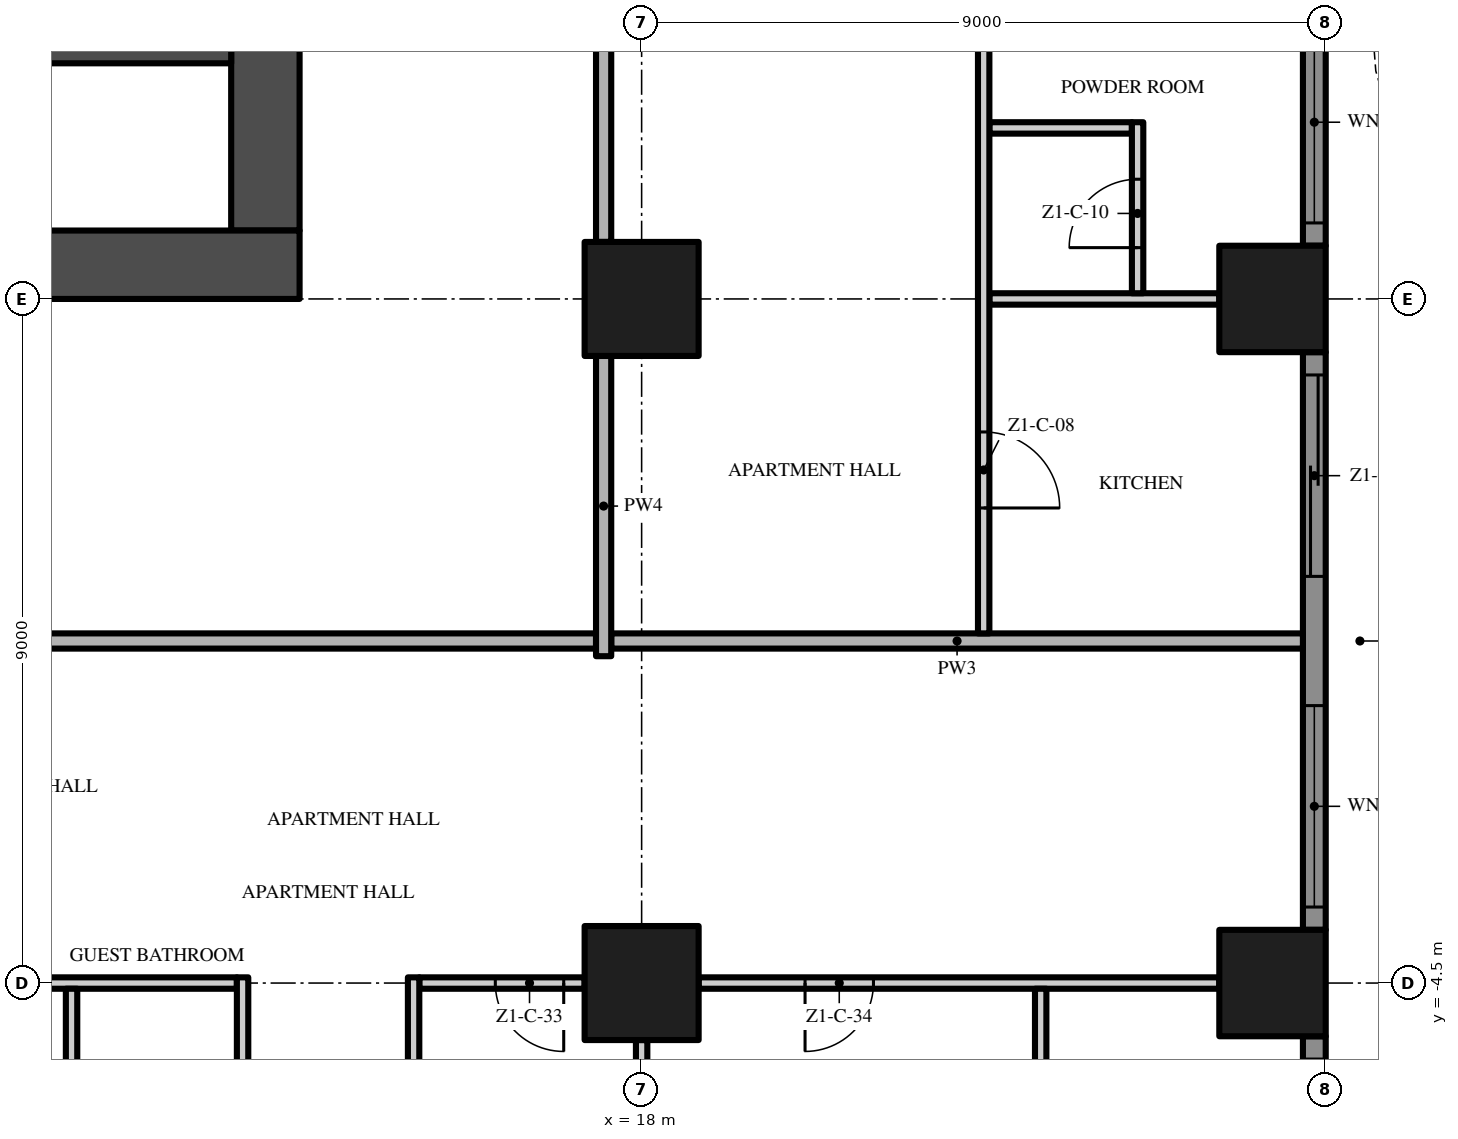
"""IFC4 building model, lengths in metres.
Left out: names, types, materials, properties, quantities, classifications, styles, units other than length and angle.
Written with IfcOpenShell. Run it as: python <this file> out.ifc"""

import sys

from ifc_helpers import new_model, si_unit, direction, frame, frame_2d, origin, origin_2d, place, context, subcontext, project, spatial, polyline, rectangle, outline, extrude, element, fill, save


model = new_model("IFC4")
c1 = context("Model", 3, precision=1e-05, world=origin(), true_north=direction((0.0, 1.0)))
c2 = subcontext(c1, "Body", "Model", "MODEL_VIEW")
j1 = project(units=[si_unit("LENGTHUNIT", "METRE"), si_unit("PLANEANGLEUNIT", "RADIAN")], contexts=[c1])
p1 = place(None, origin())
s1 = spatial("IfcSite", under=j1, at=p1, CompositionType="ELEMENT")
p2 = place(p1, origin())
s2 = spatial("IfcBuilding", under=s1, at=p2, CompositionType="ELEMENT")
p3 = place(p2, frame((0.0, 0.0, 45.4)))
s3 = spatial("IfcBuildingStorey", under=s2, at=p3, CompositionType="ELEMENT", Elevation=45.4)
p4 = place(p3, frame((-13.5, 4.95, -0.3), z_axis=(0.0, 0.0, 1.0), x_axis=(1.0, 0.0, 0.0)))
e1 = element("IfcWall", 1, at=p4, inside=s3, PredefinedType="SHEAR", context=c2, shape_type="SweptSolid", body=[
    extrude(rectangle(XDim=27.0, YDim=0.9, at=frame_2d((13.5, 0.0))), origin(), (0.0, 0.0, 1.0), 3.8),
])
p5 = place(p4, frame((12.0, 0.0, 0.3)))
e2 = element("IfcOpeningElement", 2, at=p5, cuts=e1, PredefinedType="OPENING", context=c2, shape_type="SweptSolid", body=[
    extrude(rectangle(XDim=3.0, YDim=2.4, at=frame_2d((1.5, 1.2))), frame((0.0, 0.46, 0.0), z_axis=(0.0, -1.0, 0.0), x_axis=(1.0, 0.0, 0.0)), (0.0, 0.0, 1.0), 0.92),
])
p6 = place(p4, frame((4.9, 0.0, 0.3)))
e3 = element("IfcOpeningElement", 3, at=p6, cuts=e1, PredefinedType="OPENING", context=c2, shape_type="SweptSolid", body=[
    extrude(rectangle(XDim=1.2, YDim=2.2, at=frame_2d((0.6, 1.1))), frame((0.0, 0.46, 0.0), z_axis=(0.0, -1.0, 0.0), x_axis=(1.0, 0.0, 0.0)), (0.0, 0.0, 1.0), 0.92),
])
p7 = place(p4, frame((20.75, 0.0, 0.3)))
e4 = element("IfcOpeningElement", 4, at=p7, cuts=e1, PredefinedType="OPENING", context=c2, shape_type="SweptSolid", body=[
    extrude(rectangle(XDim=1.5, YDim=2.2, at=frame_2d((0.75, 1.1))), frame((0.0, 0.46, 0.0), z_axis=(0.0, -1.0, 0.0), x_axis=(1.0, 0.0, 0.0)), (0.0, 0.0, 1.0), 0.92),
])
p8 = place(p4, frame((17.4, 0.0, 0.3)))
e5 = element("IfcOpeningElement", 5, at=p8, cuts=e1, PredefinedType="OPENING", context=c2, shape_type="SweptSolid", body=[
    extrude(rectangle(XDim=1.2, YDim=2.2, at=frame_2d((0.6, 1.1))), frame((0.0, 0.46, 0.0), z_axis=(0.0, -1.0, 0.0), x_axis=(1.0, 0.0, 0.0)), (0.0, 0.0, 1.0), 0.92),
])
p9 = place(p3, frame((13.05, 5.4, -0.3), z_axis=(0.0, 0.0, 1.0), x_axis=(0.0, 1.0, 0.0)))
e6 = element("IfcWall", 6, at=p9, inside=s3, PredefinedType="SHEAR", context=c2, shape_type="SweptSolid", body=[
    extrude(rectangle(XDim=16.2, YDim=0.9, at=frame_2d((8.1, 0.0))), origin(), (0.0, 0.0, 1.0), 3.8),
])
p10 = place(p9, frame((6.0, 0.0, 0.3)))
e7 = element("IfcOpeningElement", 7, at=p10, cuts=e6, PredefinedType="OPENING", context=c2, shape_type="SweptSolid", body=[
    extrude(rectangle(XDim=1.2, YDim=2.2, at=frame_2d((0.6, 1.1))), frame((0.0, 0.46, 0.0), z_axis=(0.0, -1.0, 0.0), x_axis=(1.0, 0.0, 0.0)), (0.0, 0.0, 1.0), 0.92),
])
for number, where, z_axis, x_axis in (
    (8, (18.0, -4.5, 0.0), (0.0, 0.0, 1.0), (1.0, 0.0, 0.0)),
    (9, (18.0, 4.5, 0.0), (0.0, 0.0, 1.0), (1.0, 0.0, 0.0)),
):
    element("IfcColumn", number, at=place(p3, frame(where, z_axis=z_axis, x_axis=x_axis)), inside=s3, PredefinedType="COLUMN", context=c2, shape_type="SweptSolid", body=[
        extrude(rectangle(XDim=1.5, YDim=1.5, at=origin_2d()), origin(), (0.0, 0.0, 1.0), 3.5),
    ])
for number, where, z_axis, x_axis in (
    (10, (26.3, -4.5, 0.0), (0.0, 0.0, 1.0), (1.0, 0.0, 0.0)),
    (11, (26.3, 4.5, 0.0), (0.0, 0.0, 1.0), (1.0, 0.0, 0.0)),
):
    element("IfcColumn", number, at=place(p3, frame(where, z_axis=z_axis, x_axis=x_axis)), inside=s3, PredefinedType="COLUMN", context=c2, shape_type="SweptSolid", body=[
        extrude(rectangle(XDim=1.4, YDim=1.4, at=origin_2d()), origin(), (0.0, 0.0, 1.0), 3.5),
    ])
p11 = place(p3, frame((26.85, -5.2, 0.0), z_axis=(0.0, 0.0, 1.0), x_axis=(0.0, -1.0, 0.0)))
e12 = element("IfcWall", 12, at=p11, inside=s3, PredefinedType="SOLIDWALL", context=c2, shape_type="SweptSolid", body=[
    extrude(rectangle(XDim=7.6, YDim=0.3, at=frame_2d((3.8, 0.0))), origin(), (0.0, 0.0, 1.0), 3.5),
])
p12 = place(p11, frame((4.65, 0.0, 0.45)))
e13 = element("IfcOpeningElement", 13, at=p12, cuts=e12, PredefinedType="OPENING", context=c2, shape_type="SweptSolid", body=[
    extrude(rectangle(XDim=2.65, YDim=2.65, at=frame_2d((1.325, 1.325))), frame((0.0, 0.16, 0.0), z_axis=(0.0, -1.0, 0.0), x_axis=(1.0, 0.0, 0.0)), (0.0, 0.0, 1.0), 0.32),
])
p13 = place(p11, frame((0.3, 0.0, 0.45)))
e14 = element("IfcOpeningElement", 14, at=p13, cuts=e12, PredefinedType="OPENING", context=c2, shape_type="SweptSolid", body=[
    extrude(rectangle(XDim=2.65, YDim=2.65, at=frame_2d((1.325, 1.325))), frame((0.0, 0.16, 0.0), z_axis=(0.0, -1.0, 0.0), x_axis=(1.0, 0.0, 0.0)), (0.0, 0.0, 1.0), 0.32),
])
p14 = place(p3, frame((26.85, 3.8, 0.0), z_axis=(0.0, 0.0, 1.0), x_axis=(0.0, -1.0, 0.0)))
e15 = element("IfcWall", 15, at=p14, inside=s3, PredefinedType="SOLIDWALL", context=c2, shape_type="SweptSolid", body=[
    extrude(rectangle(XDim=7.6, YDim=0.3, at=frame_2d((3.8, 0.0))), origin(), (0.0, 0.0, 1.0), 3.5),
])
p15 = place(p14, frame((4.65, 0.0, 0.45)))
e16 = element("IfcOpeningElement", 16, at=p15, cuts=e15, PredefinedType="OPENING", context=c2, shape_type="SweptSolid", body=[
    extrude(rectangle(XDim=2.65, YDim=2.65, at=frame_2d((1.325, 1.325))), frame((0.0, 0.16, 0.0), z_axis=(0.0, -1.0, 0.0), x_axis=(1.0, 0.0, 0.0)), (0.0, 0.0, 1.0), 0.32),
])
p16 = place(p14, frame((0.3, 0.0, 0.0)))
e17 = element("IfcOpeningElement", 17, at=p16, cuts=e15, PredefinedType="OPENING", context=c2, shape_type="SweptSolid", body=[
    extrude(rectangle(XDim=2.65, YDim=2.4, at=frame_2d((1.325, 1.2))), frame((0.0, 0.16, 0.0), z_axis=(0.0, -1.0, 0.0), x_axis=(1.0, 0.0, 0.0)), (0.0, 0.0, 1.0), 0.32),
])
p17 = place(p3, frame((26.85, 12.8, 0.0), z_axis=(0.0, 0.0, 1.0), x_axis=(0.0, -1.0, 0.0)))
e18 = element("IfcWall", 18, at=p17, inside=s3, PredefinedType="SOLIDWALL", context=c2, shape_type="SweptSolid", body=[
    extrude(rectangle(XDim=7.6, YDim=0.3, at=frame_2d((3.8, 0.0))), origin(), (0.0, 0.0, 1.0), 3.5),
])
p18 = place(p17, frame((4.65, 0.0, 0.45)))
e19 = element("IfcOpeningElement", 19, at=p18, cuts=e18, PredefinedType="OPENING", context=c2, shape_type="SweptSolid", body=[
    extrude(rectangle(XDim=2.65, YDim=2.65, at=frame_2d((1.325, 1.325))), frame((0.0, 0.16, 0.0), z_axis=(0.0, -1.0, 0.0), x_axis=(1.0, 0.0, 0.0)), (0.0, 0.0, 1.0), 0.32),
])
p19 = place(p17, frame((0.3, 0.0, 0.45)))
e20 = element("IfcOpeningElement", 20, at=p19, cuts=e18, PredefinedType="OPENING", context=c2, shape_type="SweptSolid", body=[
    extrude(rectangle(XDim=2.65, YDim=2.65, at=frame_2d((1.325, 1.325))), frame((0.0, 0.16, 0.0), z_axis=(0.0, -1.0, 0.0), x_axis=(1.0, 0.0, 0.0)), (0.0, 0.0, 1.0), 0.32),
])
p20 = place(p3, origin())
e21 = element("IfcWall", 21, at=p20, inside=s3, PredefinedType="USERDEFINED", context=c2, shape_type="SweptSolid", body=[
    extrude(outline(polyline([(28.8, -18.0), (29.505, -16.5), (29.941, -15.0), (30.0, -14.25), (29.941, -13.5), (29.505, -12.0), (28.8, -10.5), (28.095, -9.0), (27.659, -7.5), (27.6, -6.75), (27.659, -6.0), (28.095, -4.5), (28.8, -3.0), (29.505, -1.5), (29.941, 0.0), (30.0, 0.75), (29.941, 1.5), (29.505, 3.0), (28.8, 4.5), (28.095, 6.0), (27.659, 7.5), (27.6, 8.25), (27.659, 9.0), (28.095, 10.5), (28.8, 12.0), (29.505, 13.5), (29.941, 15.0), (30.0, 15.75), (29.941, 16.5), (29.505, 18.0), (29.265, 17.93), (29.694, 16.455), (29.749, 15.75), (29.694, 15.045), (29.271, 13.589), (28.574, 12.106), (27.86, 10.589), (27.411, 9.045), (27.349, 8.25), (27.411, 7.455), (27.86, 5.911), (28.574, 4.394), (29.271, 2.911), (29.694, 1.455), (29.749, 0.75), (29.694, 0.045), (29.271, -1.411), (28.574, -2.894), (27.86, -4.411), (27.411, -5.955), (27.349, -6.75), (27.411, -7.545), (27.86, -9.089), (28.574, -10.606), (29.271, -12.089), (29.694, -13.545), (29.749, -14.25), (29.694, -14.955), (29.271, -16.411), (28.574, -17.894), (28.8, -18.0)])), origin(), (0.0, 0.0, 1.0), 0.9),
])
p21 = place(p3, frame((9.65, 7.7, 0.0), z_axis=(0.0, 0.0, 1.0), x_axis=(1.0, 0.0, 0.0)))
e22 = element("IfcWall", 22, at=p21, inside=s3, PredefinedType="SHEAR", context=c2, shape_type="SweptSolid", body=[
    extrude(rectangle(XDim=2.95, YDim=0.2, at=frame_2d((1.475, 0.0))), origin(), (0.0, 0.0, 1.0), 3.5),
])
p22 = place(p3, frame((9.75, -4.5, 0.0), z_axis=(0.0, 0.0, 1.0), x_axis=(1.0, 0.0, 0.0)))
e23 = element("IfcWall", 23, at=p22, inside=s3, PredefinedType="PARTITIONING", context=c2, shape_type="SweptSolid", body=[
    extrude(rectangle(XDim=2.925, YDim=0.15, at=frame_2d((1.462, 0.0))), origin(), (0.0, 0.0, 1.0), 3.5),
])
p23 = place(p3, frame((17.25, -4.5, 0.0), z_axis=(0.0, 0.0, 1.0), x_axis=(-1.0, 0.0, 0.0)))
e24 = element("IfcWall", 24, at=p23, inside=s3, PredefinedType="PARTITIONING", context=c2, shape_type="SweptSolid", body=[
    extrude(rectangle(XDim=2.175, YDim=0.15, at=frame_2d((1.087, 0.0))), origin(), (0.0, 0.0, 1.0), 3.5),
])
p24 = place(p23, frame((0.275, 0.0, 0.0)))
e25 = element("IfcOpeningElement", 25, at=p24, cuts=e24, PredefinedType="OPENING", context=c2, shape_type="SweptSolid", body=[
    extrude(rectangle(XDim=0.9, YDim=2.1, at=frame_2d((0.45, 1.05))), frame((0.0, 0.085, 0.0), z_axis=(0.0, -1.0, 0.0), x_axis=(1.0, 0.0, 0.0)), (0.0, 0.0, 1.0), 0.17),
])
p25 = place(p3, frame((25.6, -4.5, 0.0), z_axis=(0.0, 0.0, 1.0), x_axis=(-1.0, 0.0, 0.0)))
e26 = element("IfcWall", 26, at=p25, inside=s3, PredefinedType="PARTITIONING", context=c2, shape_type="SweptSolid", body=[
    extrude(rectangle(XDim=6.85, YDim=0.15, at=frame_2d((3.425, 0.0))), origin(), (0.0, 0.0, 1.0), 3.5),
])
p26 = place(p25, frame((4.55, 0.0, 0.0)))
e27 = element("IfcOpeningElement", 27, at=p26, cuts=e26, PredefinedType="OPENING", context=c2, shape_type="SweptSolid", body=[
    extrude(rectangle(XDim=0.9, YDim=2.1, at=frame_2d((0.45, 1.05))), frame((0.0, 0.085, 0.0), z_axis=(0.0, -1.0, 0.0), x_axis=(1.0, 0.0, 0.0)), (0.0, 0.0, 1.0), 0.17),
])
p27 = place(p3, frame((17.4, 0.0, 0.0), z_axis=(0.0, 0.0, 1.0), x_axis=(-1.0, 0.0, 0.0)))
e28 = element("IfcWall", 28, at=p27, inside=s3, PredefinedType="PARTITIONING", context=c2, shape_type="SweptSolid", body=[
    extrude(rectangle(XDim=17.3, YDim=0.2, at=frame_2d((8.65, 0.0))), origin(), (0.0, 0.0, 1.0), 3.5),
])
p28 = place(p27, frame((7.65, 0.0, 0.0)))
e29 = element("IfcOpeningElement", 29, at=p28, cuts=e28, PredefinedType="OPENING", context=c2, shape_type="SweptSolid", body=[
    extrude(rectangle(XDim=1.5, YDim=2.4, at=frame_2d((0.75, 1.2))), frame((0.0, 0.11, 0.0), z_axis=(0.0, -1.0, 0.0), x_axis=(1.0, 0.0, 0.0)), (0.0, 0.0, 1.0), 0.22),
])
p29 = place(p3, frame((17.6, 0.0, 0.0), z_axis=(0.0, 0.0, 1.0), x_axis=(1.0, 0.0, 0.0)))
e30 = element("IfcWall", 30, at=p29, inside=s3, PredefinedType="PARTITIONING", context=c2, shape_type="SweptSolid", body=[
    extrude(rectangle(XDim=9.1, YDim=0.2, at=frame_2d((4.55, 0.0))), origin(), (0.0, 0.0, 1.0), 3.5),
])
p30 = place(p3, frame((22.575, 4.5, 0.0), z_axis=(0.0, 0.0, 1.0), x_axis=(1.0, 0.0, 0.0)))
e31 = element("IfcWall", 31, at=p30, inside=s3, PredefinedType="PARTITIONING", context=c2, shape_type="SweptSolid", body=[
    extrude(rectangle(XDim=3.025, YDim=0.15, at=frame_2d((1.512, 0.0))), origin(), (0.0, 0.0, 1.0), 3.5),
])
p31 = place(p3, frame((22.575, 6.75, 0.0), z_axis=(0.0, 0.0, 1.0), x_axis=(1.0, 0.0, 0.0)))
e32 = element("IfcWall", 32, at=p31, inside=s3, PredefinedType="PARTITIONING", context=c2, shape_type="SweptSolid", body=[
    extrude(rectangle(XDim=1.875, YDim=0.15, at=frame_2d((0.938, 0.0))), origin(), (0.0, 0.0, 1.0), 3.5),
])
p32 = place(p3, frame((10.5, -8.925, 0.0), z_axis=(0.0, 0.0, 1.0), x_axis=(0.0, 1.0, 0.0)))
e33 = element("IfcWall", 33, at=p32, inside=s3, PredefinedType="PARTITIONING", context=c2, shape_type="SweptSolid", body=[
    extrude(rectangle(XDim=4.35, YDim=0.15, at=frame_2d((2.175, 0.0))), origin(), (0.0, 0.0, 1.0), 3.5),
])
p33 = place(p3, frame((12.75, -8.925, 0.0), z_axis=(0.0, 0.0, 1.0), x_axis=(0.0, 1.0, 0.0)))
e34 = element("IfcWall", 34, at=p33, inside=s3, PredefinedType="PARTITIONING", context=c2, shape_type="SweptSolid", body=[
    extrude(rectangle(XDim=4.5, YDim=0.15, at=frame_2d((2.25, 0.0))), origin(), (0.0, 0.0, 1.0), 3.5),
])
p34 = place(p33, frame((1.75, 0.0, 0.0)))
e35 = element("IfcOpeningElement", 35, at=p34, cuts=e34, PredefinedType="OPENING", context=c2, shape_type="SweptSolid", body=[
    extrude(rectangle(XDim=0.9, YDim=2.1, at=frame_2d((0.45, 1.05))), frame((0.0, 0.085, 0.0), z_axis=(0.0, -1.0, 0.0), x_axis=(1.0, 0.0, 0.0)), (0.0, 0.0, 1.0), 0.17),
])
p35 = place(p3, frame((15.0, -9.075, 0.0), z_axis=(0.0, 0.0, 1.0), x_axis=(0.0, 1.0, 0.0)))
e36 = element("IfcWall", 36, at=p35, inside=s3, PredefinedType="PARTITIONING", context=c2, shape_type="SweptSolid", body=[
    extrude(rectangle(XDim=4.65, YDim=0.15, at=frame_2d((2.325, 0.0))), origin(), (0.0, 0.0, 1.0), 3.5),
])
p36 = place(p3, frame((17.5, -0.2, 0.0), z_axis=(0.0, 0.0, 1.0), x_axis=(0.0, 1.0, 0.0)))
e37 = element("IfcWall", 37, at=p36, inside=s3, PredefinedType="PARTITIONING", context=c2, shape_type="SweptSolid", body=[
    extrude(rectangle(XDim=3.95, YDim=0.2, at=frame_2d((1.975, 0.0))), origin(), (0.0, 0.0, 1.0), 3.5),
])
p37 = place(p3, frame((17.5, 12.75, 0.0), z_axis=(0.0, 0.0, 1.0), x_axis=(0.0, -1.0, 0.0)))
e38 = element("IfcWall", 38, at=p37, inside=s3, PredefinedType="PARTITIONING", context=c2, shape_type="SweptSolid", body=[
    extrude(rectangle(XDim=7.5, YDim=0.2, at=frame_2d((3.75, 0.0))), origin(), (0.0, 0.0, 1.0), 3.5),
])
p38 = place(p37, frame((3.15, 0.0, 0.0)))
e39 = element("IfcOpeningElement", 39, at=p38, cuts=e38, PredefinedType="OPENING", context=c2, shape_type="SweptSolid", body=[
    extrude(rectangle(XDim=1.2, YDim=2.4, at=frame_2d((0.6, 1.2))), frame((0.0, 0.11, 0.0), z_axis=(0.0, -1.0, 0.0), x_axis=(1.0, 0.0, 0.0)), (0.0, 0.0, 1.0), 0.22),
])
p39 = place(p3, frame((18.0, -8.925, 0.0), z_axis=(0.0, 0.0, 1.0), x_axis=(0.0, 1.0, 0.0)))
e40 = element("IfcWall", 40, at=p39, inside=s3, PredefinedType="PARTITIONING", context=c2, shape_type="SweptSolid", body=[
    extrude(rectangle(XDim=3.675, YDim=0.15, at=frame_2d((1.837, 0.0))), origin(), (0.0, 0.0, 1.0), 3.5),
])
p40 = place(p3, frame((22.5, 17.3, 0.0), z_axis=(0.0, 0.0, 1.0), x_axis=(0.0, -1.0, 0.0)))
e41 = element("IfcWall", 41, at=p40, inside=s3, PredefinedType="PARTITIONING", context=c2, shape_type="SweptSolid", body=[
    extrude(rectangle(XDim=17.2, YDim=0.15, at=frame_2d((8.6, 0.0))), origin(), (0.0, 0.0, 1.0), 3.5),
])
p41 = place(p40, frame((14.55, 0.0, 0.0)))
e42 = element("IfcOpeningElement", 42, at=p41, cuts=e41, PredefinedType="OPENING", context=c2, shape_type="SweptSolid", body=[
    extrude(rectangle(XDim=1.0, YDim=2.4, at=frame_2d((0.5, 1.2))), frame((0.0, 0.085, 0.0), z_axis=(0.0, -1.0, 0.0), x_axis=(1.0, 0.0, 0.0)), (0.0, 0.0, 1.0), 0.17),
])
p42 = place(p40, frame((7.4, 0.0, 0.0)))
e43 = element("IfcOpeningElement", 43, at=p42, cuts=e41, PredefinedType="OPENING", context=c2, shape_type="SweptSolid", body=[
    extrude(rectangle(XDim=1.8, YDim=2.4, at=frame_2d((0.9, 1.2))), frame((0.0, 0.085, 0.0), z_axis=(0.0, -1.0, 0.0), x_axis=(1.0, 0.0, 0.0)), (0.0, 0.0, 1.0), 0.17),
])
p43 = place(p40, frame((0.15, 0.0, 0.0)))
e44 = element("IfcOpeningElement", 44, at=p43, cuts=e41, PredefinedType="OPENING", context=c2, shape_type="SweptSolid", body=[
    extrude(rectangle(XDim=1.0, YDim=2.4, at=frame_2d((0.5, 1.2))), frame((0.0, 0.085, 0.0), z_axis=(0.0, -1.0, 0.0), x_axis=(1.0, 0.0, 0.0)), (0.0, 0.0, 1.0), 0.17),
])
p44 = place(p3, frame((23.25, -4.575, 0.0), z_axis=(0.0, 0.0, 1.0), x_axis=(0.0, -1.0, 0.0)))
e45 = element("IfcWall", 45, at=p44, inside=s3, PredefinedType="PARTITIONING", context=c2, shape_type="SweptSolid", body=[
    extrude(rectangle(XDim=4.35, YDim=0.15, at=frame_2d((2.175, 0.0))), origin(), (0.0, 0.0, 1.0), 3.5),
])
p45 = place(p44, frame((1.7, 0.0, 0.0)))
e46 = element("IfcOpeningElement", 46, at=p45, cuts=e45, PredefinedType="OPENING", context=c2, shape_type="SweptSolid", body=[
    extrude(rectangle(XDim=0.9, YDim=2.1, at=frame_2d((0.45, 1.05))), frame((0.0, 0.085, 0.0), z_axis=(0.0, -1.0, 0.0), x_axis=(1.0, 0.0, 0.0)), (0.0, 0.0, 1.0), 0.17),
])
p46 = place(p3, frame((24.525, 4.575, 0.0), z_axis=(0.0, 0.0, 1.0), x_axis=(0.0, 1.0, 0.0)))
e47 = element("IfcWall", 47, at=p46, inside=s3, PredefinedType="PARTITIONING", context=c2, shape_type="SweptSolid", body=[
    extrude(rectangle(XDim=2.25, YDim=0.15, at=frame_2d((1.125, 0.0))), origin(), (0.0, 0.0, 1.0), 3.5),
])
p47 = place(p46, frame((0.6, 0.0, 0.0)))
e48 = element("IfcOpeningElement", 48, at=p47, cuts=e47, PredefinedType="OPENING", context=c2, shape_type="SweptSolid", body=[
    extrude(rectangle(XDim=0.9, YDim=2.1, at=frame_2d((0.45, 1.05))), frame((0.0, 0.085, 0.0), z_axis=(0.0, -1.0, 0.0), x_axis=(1.0, 0.0, 0.0)), (0.0, 0.0, 1.0), 0.17),
])
p48 = place(p15, origin())
e49 = element("IfcWindow", 49, at=p48, inside=s3, PartitioningType="SINGLE_PANEL", PredefinedType="WINDOW", context=c2, shape_type="SweptSolid", body=[
    extrude(rectangle(XDim=2.65, YDim=2.65, at=frame_2d((1.325, 1.325))), frame((0.0, 0.03, 0.0), z_axis=(0.0, -1.0, 0.0), x_axis=(1.0, 0.0, 0.0)), (0.0, 0.0, 1.0), 0.06),
])
fill(e16, e49)
p49 = place(p16, origin())
e50 = element("IfcDoor", 50, at=p49, inside=s3, OperationType="SINGLE_SWING_LEFT", PredefinedType="DOOR", context=c2, shape_type="SweptSolid", body=[
    extrude(rectangle(XDim=2.65, YDim=2.4, at=frame_2d((1.325, 1.2))), frame((0.0, 0.025, 0.0), z_axis=(0.0, -1.0, 0.0), x_axis=(1.0, 0.0, 0.0)), (0.0, 0.0, 1.0), 0.05),
])
fill(e17, e50)
p50 = place(p18, origin())
e51 = element("IfcWindow", 51, at=p50, inside=s3, PartitioningType="SINGLE_PANEL", PredefinedType="WINDOW", context=c2, shape_type="SweptSolid", body=[
    extrude(rectangle(XDim=2.65, YDim=2.65, at=frame_2d((1.325, 1.325))), frame((0.0, 0.03, 0.0), z_axis=(0.0, -1.0, 0.0), x_axis=(1.0, 0.0, 0.0)), (0.0, 0.0, 1.0), 0.06),
])
fill(e19, e51)
p51 = place(p41, origin())
e52 = element("IfcDoor", 52, at=p51, inside=s3, OperationType="SINGLE_SWING_RIGHT", PredefinedType="DOOR", context=c2, shape_type="SweptSolid", body=[
    extrude(rectangle(XDim=1.0, YDim=2.4, at=frame_2d((0.5, 1.2))), frame((0.0, 0.025, 0.0), z_axis=(0.0, -1.0, 0.0), x_axis=(1.0, 0.0, 0.0)), (0.0, 0.0, 1.0), 0.05),
])
fill(e42, e52)
p52 = place(p47, origin())
e53 = element("IfcDoor", 53, at=p52, inside=s3, OperationType="SINGLE_SWING_LEFT", PredefinedType="DOOR", context=c2, shape_type="SweptSolid", body=[
    extrude(rectangle(XDim=0.9, YDim=2.1, at=frame_2d((0.45, 1.05))), frame((0.0, 0.025, 0.0), z_axis=(0.0, -1.0, 0.0), x_axis=(1.0, 0.0, 0.0)), (0.0, 0.0, 1.0), 0.05),
])
fill(e48, e53)
p53 = place(p24, origin())
e54 = element("IfcDoor", 54, at=p53, inside=s3, OperationType="SINGLE_SWING_LEFT", PredefinedType="DOOR", context=c2, shape_type="SweptSolid", body=[
    extrude(rectangle(XDim=0.9, YDim=2.1, at=frame_2d((0.45, 1.05))), frame((0.0, 0.025, 0.0), z_axis=(0.0, -1.0, 0.0), x_axis=(1.0, 0.0, 0.0)), (0.0, 0.0, 1.0), 0.05),
])
fill(e25, e54)
p54 = place(p26, origin())
e55 = element("IfcDoor", 55, at=p54, inside=s3, OperationType="SINGLE_SWING_RIGHT", PredefinedType="DOOR", context=c2, shape_type="SweptSolid", body=[
    extrude(rectangle(XDim=0.9, YDim=2.1, at=frame_2d((0.45, 1.05))), frame((0.0, 0.025, 0.0), z_axis=(0.0, -1.0, 0.0), x_axis=(1.0, 0.0, 0.0)), (0.0, 0.0, 1.0), 0.05),
])
fill(e27, e55)
save(model, sys.argv[1])
